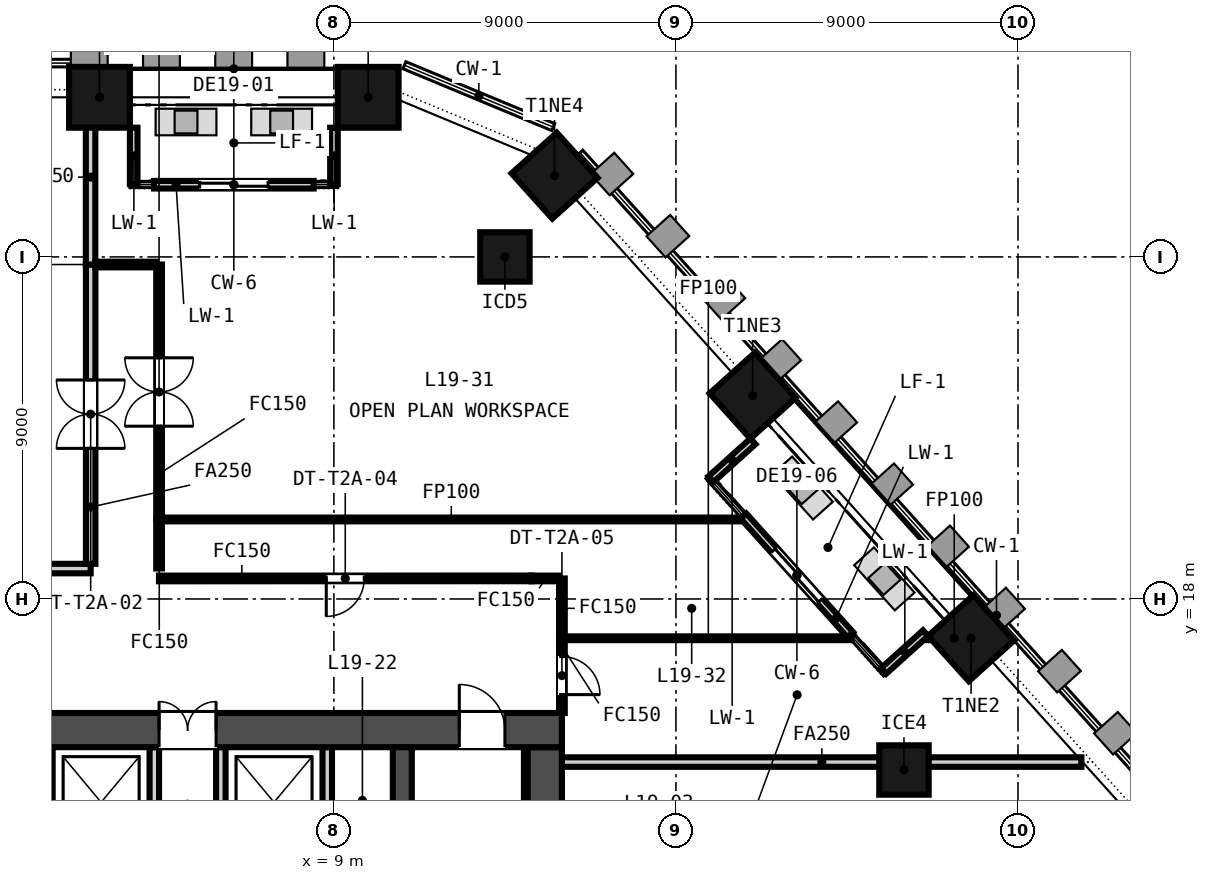
"""IFC4 building model, lengths in metres.
Left out: names, types, materials, properties, quantities, classifications, styles, units other than length and angle.
Written with IfcOpenShell. Run it as: python <this file> out.ifc"""

import sys

from ifc_helpers import new_model, si_unit, direction, frame, frame_2d, origin, origin_2d, place, context, subcontext, project, spatial, rectangle, extrude, element, fill, save


model = new_model("IFC4")
c1 = context("Model", 3, precision=1e-05, world=origin(), true_north=direction((0.0, 1.0)))
c2 = subcontext(c1, "Body", "Model", "MODEL_VIEW")
j1 = project(units=[si_unit("LENGTHUNIT", "METRE"), si_unit("PLANEANGLEUNIT", "RADIAN")], contexts=[c1])
p1 = place(None, origin())
s1 = spatial("IfcSite", under=j1, at=p1, CompositionType="ELEMENT")
p2 = place(p1, origin())
s2 = spatial("IfcBuilding", under=s1, at=p2, CompositionType="ELEMENT")
p3 = place(p2, frame((0.0, 0.0, 84.3)))
s3 = spatial("IfcBuildingStorey", under=s2, at=p3, CompositionType="ELEMENT", Elevation=84.3)
p4 = place(p3, frame((-15.0, 14.55, -0.15), z_axis=(0.0, 0.0, 1.0), x_axis=(1.0, 0.0, 0.0)))
e1 = element("IfcWall", 1, at=p4, inside=s3, PredefinedType="SOLIDWALL", context=c2, shape_type="SweptSolid", body=[
    extrude(rectangle(XDim=30.0, YDim=0.9, at=frame_2d((15.0, 0.0))), origin(), (0.0, 0.0, 1.0), 3.65),
])
p5 = place(p4, frame((9.25, 0.0, 0.15)))
e2 = element("IfcOpeningElement", 2, at=p5, cuts=e1, PredefinedType="OPENING", context=c2, shape_type="SweptSolid", body=[
    extrude(rectangle(XDim=1.5, YDim=2.1, at=frame_2d((0.75, 1.05))), frame((0.0, 0.46, 0.0), z_axis=(0.0, -1.0, 0.0), x_axis=(1.0, 0.0, 0.0)), (0.0, 0.0, 1.0), 0.92),
])
p6 = place(p4, frame((19.4, 0.0, 0.15)))
e3 = element("IfcOpeningElement", 3, at=p6, cuts=e1, PredefinedType="OPENING", context=c2, shape_type="SweptSolid", body=[
    extrude(rectangle(XDim=1.5, YDim=2.1, at=frame_2d((0.75, 1.05))), frame((0.0, 0.46, 0.0), z_axis=(0.0, -1.0, 0.0), x_axis=(1.0, 0.0, 0.0)), (0.0, 0.0, 1.0), 0.92),
])
p7 = place(p4, frame((1.5, 0.0, 0.15)))
e4 = element("IfcOpeningElement", 4, at=p7, cuts=e1, PredefinedType="OPENING", context=c2, shape_type="SweptSolid", body=[
    extrude(rectangle(XDim=1.2, YDim=2.1, at=frame_2d((0.6, 1.05))), frame((0.0, 0.46, 0.0), z_axis=(0.0, -1.0, 0.0), x_axis=(1.0, 0.0, 0.0)), (0.0, 0.0, 1.0), 0.92),
])
p8 = place(p4, frame((27.3, 0.0, 0.15)))
e5 = element("IfcOpeningElement", 5, at=p8, cuts=e1, PredefinedType="OPENING", context=c2, shape_type="SweptSolid", body=[
    extrude(rectangle(XDim=1.2, YDim=2.1, at=frame_2d((0.6, 1.05))), frame((0.0, 0.46, 0.0), z_axis=(0.0, -1.0, 0.0), x_axis=(1.0, 0.0, 0.0)), (0.0, 0.0, 1.0), 0.92),
])
p9 = place(p3, frame((14.55, 0.9, -0.15), z_axis=(0.0, 0.0, 1.0), x_axis=(0.0, 1.0, 0.0)))
e6 = element("IfcWall", 6, at=p9, inside=s3, PredefinedType="SOLIDWALL", context=c2, shape_type="SweptSolid", body=[
    extrude(rectangle(XDim=13.2, YDim=0.9, at=frame_2d((6.6, 0.0))), origin(), (0.0, 0.0, 1.0), 3.65),
])
p10 = place(p3, frame((10.8, 0.9, -0.15), z_axis=(0.0, 0.0, 1.0), x_axis=(0.0, 1.0, 0.0)))
e7 = element("IfcWall", 7, at=p10, inside=s3, PredefinedType="SOLIDWALL", context=c2, shape_type="SweptSolid", body=[
    extrude(rectangle(XDim=13.2, YDim=0.5, at=frame_2d((6.6, 0.0))), origin(), (0.0, 0.0, 1.0), 3.65),
])
for number, where, z_axis, x_axis in (
    (8, (9.902, 31.2, -0.15), (0.0, 0.0, 1.0), (-1.0, 0.0, 0.0)),
    (9, (2.832, 31.2, -0.15), (0.0, 0.0, 1.0), (-1.0, 0.0, 0.0)),
    (10, (25.765, 16.967, -0.15), (0.0, 0.0, 1.0), (-0.669, 0.743, 0.0)),
    (11, (20.018, 23.35, -0.15), (0.0, 0.0, 1.0), (-0.669, 0.743, 0.0)),
    (12, (14.806, 29.139, -0.15), (0.0, 0.0, 1.0), (-0.669, 0.743, 0.0)),
):
    element("IfcColumn", number, at=place(p3, frame(where, z_axis=z_axis, x_axis=x_axis)), inside=s3, PredefinedType="COLUMN", context=c2, shape_type="SweptSolid", body=[
        extrude(rectangle(XDim=1.6, YDim=1.6, at=origin_2d()), origin(), (0.0, 0.0, 1.0), 3.65),
    ])
for number, where, z_axis, x_axis in (
    (13, (13.5, 27.0, -0.15), (0.0, 0.0, 1.0), (1.0, 0.0, 0.0)),
    (14, (24.0, 13.5, -0.15), (0.0, 0.0, 1.0), (1.0, 0.0, 0.0)),
):
    element("IfcColumn", number, at=place(p3, frame(where, z_axis=z_axis, x_axis=x_axis)), inside=s3, PredefinedType="COLUMN", context=c2, shape_type="SweptSolid", body=[
        extrude(rectangle(XDim=1.3, YDim=1.3, at=origin_2d()), origin(), (0.0, 0.0, 1.0), 3.65),
    ])
p11 = place(p3, frame((8.467, 28.9, 0.0), z_axis=(0.0, 0.0, 1.0), x_axis=(-1.0, 0.0, 0.0)))
e15 = element("IfcWall", 15, at=p11, inside=s3, PredefinedType="SOLIDWALL", context=c2, shape_type="SweptSolid", body=[
    extrude(rectangle(XDim=4.2, YDim=0.2, at=frame_2d((2.1, 0.0))), origin(), (0.0, 0.0, 1.0), 3.049),
])
p12 = place(p11, frame((1.2, 0.0, 0.0)))
e16 = element("IfcOpeningElement", 16, at=p12, cuts=e15, PredefinedType="OPENING", context=c2, shape_type="SweptSolid", body=[
    extrude(rectangle(XDim=1.8, YDim=2.4, at=frame_2d((0.9, 1.2))), frame((0.0, 0.11, 0.0), z_axis=(0.0, -1.0, 0.0), x_axis=(1.0, 0.0, 0.0)), (0.0, 0.0, 1.0), 0.22),
])
for number, where, z_axis, x_axis in (
    (17, (9.002, 30.4, 0.0), (0.0, 0.0, 1.0), (0.0, -1.0, 0.0)),
    (18, (3.732, 30.4, 0.0), (0.0, 0.0, 1.0), (0.0, -1.0, 0.0)),
):
    element("IfcWall", number, at=place(p3, frame(where, z_axis=z_axis, x_axis=x_axis)), inside=s3, PredefinedType="SOLIDWALL", context=c2, shape_type="SweptSolid", body=[
        extrude(rectangle(XDim=1.484, YDim=0.2, at=frame_2d((0.742, 0.0))), origin(), (0.0, 0.0, 1.0), 3.05),
    ])
p13 = place(p3, frame((22.588, 17.059, 0.0), z_axis=(0.0, 0.0, 1.0), x_axis=(-0.669138140895, 0.743138041282, 0.0)))
e19 = element("IfcWall", 19, at=p13, inside=s3, PredefinedType="SOLIDWALL", context=c2, shape_type="SweptSolid", body=[
    extrude(rectangle(XDim=4.2, YDim=0.2, at=frame_2d((2.1, 0.0))), origin(), (0.0, 0.0, 1.0), 3.05),
])
p14 = place(p13, frame((1.2, 0.0, 0.0)))
e20 = element("IfcOpeningElement", 20, at=p14, cuts=e19, PredefinedType="OPENING", context=c2, shape_type="SweptSolid", body=[
    extrude(rectangle(XDim=1.8, YDim=2.4, at=frame_2d((0.9, 1.2))), frame((0.0, 0.11, 0.0), z_axis=(0.0, -1.0, 0.0), x_axis=(1.0, 0.0, 0.0)), (0.0, 0.0, 1.0), 0.22),
])
p15 = place(p3, frame((24.569, 17.101, 0.0), z_axis=(0.0, 0.0, 1.0), x_axis=(-0.743155057383, -0.669119242501, 0.0)))
e21 = element("IfcWall", 21, at=p15, inside=s3, PredefinedType="SOLIDWALL", context=c2, shape_type="SweptSolid", body=[
    extrude(rectangle(XDim=1.484, YDim=0.2, at=frame_2d((0.742, 0.0))), origin(), (0.0, 0.0, 1.0), 2.821),
])
p16 = place(p3, frame((20.026, 22.146, 0.0), z_axis=(0.0, 0.0, 1.0), x_axis=(-0.743155057383, -0.669119242501, 0.0)))
e22 = element("IfcWall", 22, at=p16, inside=s3, PredefinedType="SOLIDWALL", context=c2, shape_type="SweptSolid", body=[
    extrude(rectangle(XDim=1.484, YDim=0.2, at=frame_2d((0.742, 0.0))), origin(), (0.0, 0.0, 1.0), 3.05),
])
for number, where, z_axis, x_axis in (
    (23, (1.475, 11.3, 0.0), (0.0, 0.0, 1.0), (0.0, 1.0, 0.0)),
    (24, (4.275, 11.3, 0.0), (0.0, 0.0, 1.0), (0.0, 1.0, 0.0)),
    (25, (6.025, 11.3, 0.0), (0.0, 0.0, 1.0), (0.0, 1.0, 0.0)),
    (26, (8.825, 11.3, 0.0), (0.0, 0.0, 1.0), (0.0, 1.0, 0.0)),
):
    element("IfcWall", number, at=place(p3, frame(where, z_axis=z_axis, x_axis=x_axis)), inside=s3, PredefinedType="PARTITIONING", context=c2, shape_type="SweptSolid", body=[
        extrude(rectangle(XDim=2.8, YDim=0.25, at=frame_2d((1.4, 0.0))), origin(), (0.0, 0.0, 1.0), 3.5),
    ])
p17 = place(p3, frame((14.05, 0.9, 0.0), z_axis=(0.0, 0.0, 1.0), x_axis=(0.0, 1.0, 0.0)))
e27 = element("IfcWall", 27, at=p17, inside=s3, PredefinedType="SOLIDWALL", context=c2, shape_type="SweptSolid", body=[
    extrude(rectangle(XDim=13.2, YDim=0.1, at=frame_2d((6.6, 0.0))), origin(), (0.0, 0.0, 1.0), 3.5),
])
p18 = place(p3, frame((4.4, 26.8, 0.0), z_axis=(0.0, 0.0, 1.0), x_axis=(0.0, -1.0, 0.0)))
e28 = element("IfcWall", 28, at=p18, inside=s3, PredefinedType="PARTITIONING", context=c2, shape_type="SweptSolid", body=[
    extrude(rectangle(XDim=6.708, YDim=0.15, at=frame_2d((3.354, 0.0))), origin(), (0.0, 0.0, 1.0), 2.741),
])
p19 = place(p18, frame((2.454, 0.0, 0.0)))
e29 = element("IfcOpeningElement", 29, at=p19, cuts=e28, PredefinedType="OPENING", context=c2, shape_type="SweptSolid", body=[
    extrude(rectangle(XDim=1.8, YDim=2.1, at=frame_2d((0.9, 1.05))), frame((0.0, 0.085, 0.0), z_axis=(0.0, -1.0, 0.0), x_axis=(1.0, 0.0, 0.0)), (0.0, 0.0, 1.0), 0.17),
])
p20 = place(p3, frame((4.4, 20.092, 0.0), z_axis=(0.0, 0.0, 1.0), x_axis=(0.0, -1.0, 0.0)))
e30 = element("IfcWall", 30, at=p20, inside=s3, PredefinedType="PARTITIONING", context=c2, shape_type="SweptSolid", body=[
    extrude(rectangle(XDim=1.29, YDim=0.15, at=frame_2d((0.645, 0.0))), origin(), (0.0, 0.0, 1.0), 2.741),
])
p21 = place(p3, frame((15.0, 18.54, 0.0), z_axis=(0.0, 0.0, 1.0), x_axis=(0.0, -1.0, 0.0)))
e31 = element("IfcWall", 31, at=p21, inside=s3, PredefinedType="PARTITIONING", context=c2, shape_type="SweptSolid", body=[
    extrude(rectangle(XDim=1.573, YDim=0.15, at=frame_2d((0.787, 0.0))), origin(), (0.0, 0.0, 1.0), 2.741),
])
p22 = place(p3, frame((15.0, 16.967, 0.0), z_axis=(0.0, 0.0, 1.0), x_axis=(0.0, -1.0, 0.0)))
e32 = element("IfcWall", 32, at=p22, inside=s3, PredefinedType="PARTITIONING", context=c2, shape_type="SweptSolid", body=[
    extrude(rectangle(XDim=1.967, YDim=0.15, at=frame_2d((0.983, 0.0))), origin(), (0.0, 0.0, 1.0), 2.741),
])
p23 = place(p22, frame((0.483, 0.0, 0.0)))
e33 = element("IfcOpeningElement", 33, at=p23, cuts=e32, PredefinedType="OPENING", context=c2, shape_type="SweptSolid", body=[
    extrude(rectangle(XDim=1.0, YDim=2.1, at=frame_2d((0.5, 1.05))), frame((0.0, 0.085, 0.0), z_axis=(0.0, -1.0, 0.0), x_axis=(1.0, 0.0, 0.0)), (0.0, 0.0, 1.0), 0.17),
])
p24 = place(p3, frame((-18.275, 18.8, 0.0), z_axis=(0.0, 0.0, 1.0), x_axis=(1.0, 0.0, 0.0)))
e34 = element("IfcWall", 34, at=p24, inside=s3, PredefinedType="PARTITIONING", context=c2, shape_type="SweptSolid", body=[
    extrude(rectangle(XDim=20.875, YDim=0.25, at=frame_2d((10.438, 0.0))), origin(), (0.0, 0.0, 1.0), 2.741),
])
p25 = place(p24, frame((9.538, 0.0, 0.0)))
e35 = element("IfcOpeningElement", 35, at=p25, cuts=e34, PredefinedType="OPENING", context=c2, shape_type="SweptSolid", body=[
    extrude(rectangle(XDim=1.8, YDim=2.1, at=frame_2d((0.9, 1.05))), frame((0.0, 0.135, 0.0), z_axis=(0.0, -1.0, 0.0), x_axis=(1.0, 0.0, 0.0)), (0.0, 0.0, 1.0), 0.27),
])
p26 = place(p3, frame((2.6, 18.925, 0.0), z_axis=(0.0, 0.0, 1.0), x_axis=(0.0, 1.0, 0.0)))
e36 = element("IfcWall", 36, at=p26, inside=s3, PredefinedType="PARTITIONING", context=c2, shape_type="SweptSolid", body=[
    extrude(rectangle(XDim=7.875, YDim=0.25, at=frame_2d((3.938, 0.0))), origin(), (0.0, 0.0, 1.0), 2.741),
])
p27 = place(p26, frame((3.038, 0.0, 0.0)))
e37 = element("IfcOpeningElement", 37, at=p27, cuts=e36, PredefinedType="OPENING", context=c2, shape_type="SweptSolid", body=[
    extrude(rectangle(XDim=1.8, YDim=2.1, at=frame_2d((0.9, 1.05))), frame((0.0, 0.135, 0.0), z_axis=(0.0, -1.0, 0.0), x_axis=(1.0, 0.0, 0.0)), (0.0, 0.0, 1.0), 0.27),
])
p28 = place(p3, frame((2.598, 26.8, 0.0), z_axis=(0.0, 0.0, 1.0), x_axis=(0.0, 1.0, 0.0)))
e38 = element("IfcWall", 38, at=p28, inside=s3, PredefinedType="PARTITIONING", context=c2, shape_type="SweptSolid", body=[
    extrude(rectangle(XDim=4.6, YDim=0.25, at=frame_2d((2.3, 0.0))), origin(), (0.0, 0.0, 1.0), 2.741),
])
p29 = place(p3, frame((2.725, 26.8, 0.0), z_axis=(0.0, 0.0, 1.0), x_axis=(1.0, 0.0, 0.0)))
e39 = element("IfcWall", 39, at=p29, inside=s3, PredefinedType="PARTITIONING", context=c2, shape_type="SweptSolid", body=[
    extrude(rectangle(XDim=1.6, YDim=0.15, at=frame_2d((0.8, 0.0))), origin(), (0.0, 0.0, 1.0), 2.741),
])
p30 = place(p3, frame((4.475, 20.092, 0.0), z_axis=(0.0, 0.0, 1.0), x_axis=(1.0, 0.0, 0.0)))
e40 = element("IfcWall", 40, at=p30, inside=s3, PredefinedType="PARTITIONING", context=c2, shape_type="SweptSolid", body=[
    extrude(rectangle(XDim=15.217, YDim=0.1, at=frame_2d((7.609, 0.0))), origin(), (0.0, 0.0, 1.0), 2.741),
])
p31 = place(p3, frame((14.2, 18.542, 0.0), z_axis=(0.0, 0.0, 1.0), x_axis=(-0.999999980148, -0.000199257761, 0.0)))
e41 = element("IfcWall", 41, at=p31, inside=s3, PredefinedType="PARTITIONING", context=c2, shape_type="SweptSolid", body=[
    extrude(rectangle(XDim=9.802, YDim=0.15, at=frame_2d((4.901, 0.0))), origin(), (0.0, 0.0, 1.0), 2.741),
])
p32 = place(p31, frame((4.401, 0.0, 0.0)))
e42 = element("IfcOpeningElement", 42, at=p32, cuts=e41, PredefinedType="OPENING", context=c2, shape_type="SweptSolid", body=[
    extrude(rectangle(XDim=1.0, YDim=2.1, at=frame_2d((0.5, 1.05))), frame((0.0, 0.085, 0.0), z_axis=(0.0, -1.0, 0.0), x_axis=(1.0, 0.0, 0.0)), (0.0, 0.0, 1.0), 0.17),
])
p33 = place(p3, frame((14.2, 18.54, 0.0), z_axis=(0.0, 0.0, 1.0), x_axis=(1.0, 0.0, 0.0)))
e43 = element("IfcWall", 43, at=p33, inside=s3, PredefinedType="PARTITIONING", context=c2, shape_type="SweptSolid", body=[
    extrude(rectangle(XDim=0.725, YDim=0.15, at=frame_2d((0.363, 0.0))), origin(), (0.0, 0.0, 1.0), 2.741),
])
p34 = place(p3, frame((15.075, 16.967, 0.0), z_axis=(0.0, 0.0, 1.0), x_axis=(1.0, 0.0, 0.0)))
e44 = element("IfcWall", 44, at=p34, inside=s3, PredefinedType="PARTITIONING", context=c2, shape_type="SweptSolid", body=[
    extrude(rectangle(XDim=7.544, YDim=0.1, at=frame_2d((3.772, 0.0))), origin(), (0.0, 0.0, 1.0), 2.741),
])
p35 = place(p3, frame((24.6, 16.967, 0.0), z_axis=(0.0, 0.0, 1.0), x_axis=(1.0, 0.0, 0.0)))
e45 = element("IfcWall", 45, at=p35, inside=s3, PredefinedType="PARTITIONING", context=c2, shape_type="SweptSolid", body=[
    extrude(rectangle(XDim=1.435, YDim=0.1, at=frame_2d((0.718, 0.0))), origin(), (0.0, 0.0, 1.0), 2.741),
])
p36 = place(p3, frame((15.0, 13.709, 0.0), z_axis=(0.0, 0.0, 1.0), x_axis=(1.0, 0.0, 0.0)))
e46 = element("IfcWall", 46, at=p36, inside=s3, PredefinedType="PARTITIONING", context=c2, shape_type="SweptSolid", body=[
    extrude(rectangle(XDim=13.668, YDim=0.25, at=frame_2d((6.834, 0.0))), origin(), (0.0, 0.0, 1.0), 2.741),
])
p37 = place(p12, origin())
e47 = element("IfcDoor", 47, at=p37, inside=s3, OperationType="SINGLE_SWING_LEFT", PredefinedType="DOOR", context=c2, shape_type="SweptSolid", body=[
    extrude(rectangle(XDim=1.8, YDim=2.4, at=frame_2d((0.9, 1.2))), frame((0.0, 0.025, 0.0), z_axis=(0.0, -1.0, 0.0), x_axis=(1.0, 0.0, 0.0)), (0.0, 0.0, 1.0), 0.05),
])
fill(e16, e47)
p38 = place(p14, origin())
e48 = element("IfcDoor", 48, at=p38, inside=s3, OperationType="SINGLE_SWING_LEFT", PredefinedType="DOOR", context=c2, shape_type="SweptSolid", body=[
    extrude(rectangle(XDim=1.8, YDim=2.4, at=frame_2d((0.9, 1.2))), frame((0.0, 0.025, 0.0), z_axis=(0.0, -1.0, 0.0), x_axis=(1.0, 0.0, 0.0)), (0.0, 0.0, 1.0), 0.05),
])
fill(e20, e48)
p39 = place(p6, origin())
e49 = element("IfcDoor", 49, at=p39, inside=s3, OperationType="DOUBLE_DOOR_SINGLE_SWING", PredefinedType="DOOR", context=c2, shape_type="SweptSolid", body=[
    extrude(rectangle(XDim=1.5, YDim=2.1, at=frame_2d((0.75, 1.05))), frame((0.0, 0.025, 0.0), z_axis=(0.0, -1.0, 0.0), x_axis=(1.0, 0.0, 0.0)), (0.0, 0.0, 1.0), 0.05),
])
fill(e3, e49)
p40 = place(p8, origin())
e50 = element("IfcDoor", 50, at=p40, inside=s3, OperationType="SINGLE_SWING_LEFT", PredefinedType="DOOR", context=c2, shape_type="SweptSolid", body=[
    extrude(rectangle(XDim=1.2, YDim=2.1, at=frame_2d((0.6, 1.05))), frame((0.0, 0.025, 0.0), z_axis=(0.0, -1.0, 0.0), x_axis=(1.0, 0.0, 0.0)), (0.0, 0.0, 1.0), 0.05),
])
fill(e5, e50)
p41 = place(p27, origin())
e51 = element("IfcDoor", 51, at=p41, inside=s3, OperationType="DOUBLE_DOOR_DOUBLE_SWING", PredefinedType="DOOR", context=c2, shape_type="SweptSolid", body=[
    extrude(rectangle(XDim=1.8, YDim=2.1, at=frame_2d((0.9, 1.05))), frame((0.0, 0.025, 0.0), z_axis=(0.0, -1.0, 0.0), x_axis=(1.0, 0.0, 0.0)), (0.0, 0.0, 1.0), 0.05),
])
fill(e37, e51)
p42 = place(p19, origin())
e52 = element("IfcDoor", 52, at=p42, inside=s3, OperationType="DOUBLE_DOOR_DOUBLE_SWING", PredefinedType="DOOR", context=c2, shape_type="SweptSolid", body=[
    extrude(rectangle(XDim=1.8, YDim=2.1, at=frame_2d((0.9, 1.05))), frame((0.0, 0.025, 0.0), z_axis=(0.0, -1.0, 0.0), x_axis=(1.0, 0.0, 0.0)), (0.0, 0.0, 1.0), 0.05),
])
fill(e29, e52)
p43 = place(p32, origin())
e53 = element("IfcDoor", 53, at=p43, inside=s3, OperationType="SINGLE_SWING_RIGHT", PredefinedType="DOOR", context=c2, shape_type="SweptSolid", body=[
    extrude(rectangle(XDim=1.0, YDim=2.1, at=frame_2d((0.5, 1.05))), frame((0.0, 0.025, 0.0), z_axis=(0.0, -1.0, 0.0), x_axis=(1.0, 0.0, 0.0)), (0.0, 0.0, 1.0), 0.05),
])
fill(e42, e53)
p44 = place(p23, origin())
e54 = element("IfcDoor", 54, at=p44, inside=s3, OperationType="SINGLE_SWING_RIGHT", PredefinedType="DOOR", context=c2, shape_type="SweptSolid", body=[
    extrude(rectangle(XDim=1.0, YDim=2.1, at=frame_2d((0.5, 1.05))), frame((0.0, 0.025, 0.0), z_axis=(0.0, -1.0, 0.0), x_axis=(1.0, 0.0, 0.0)), (0.0, 0.0, 1.0), 0.05),
])
fill(e33, e54)
save(model, sys.argv[1])
